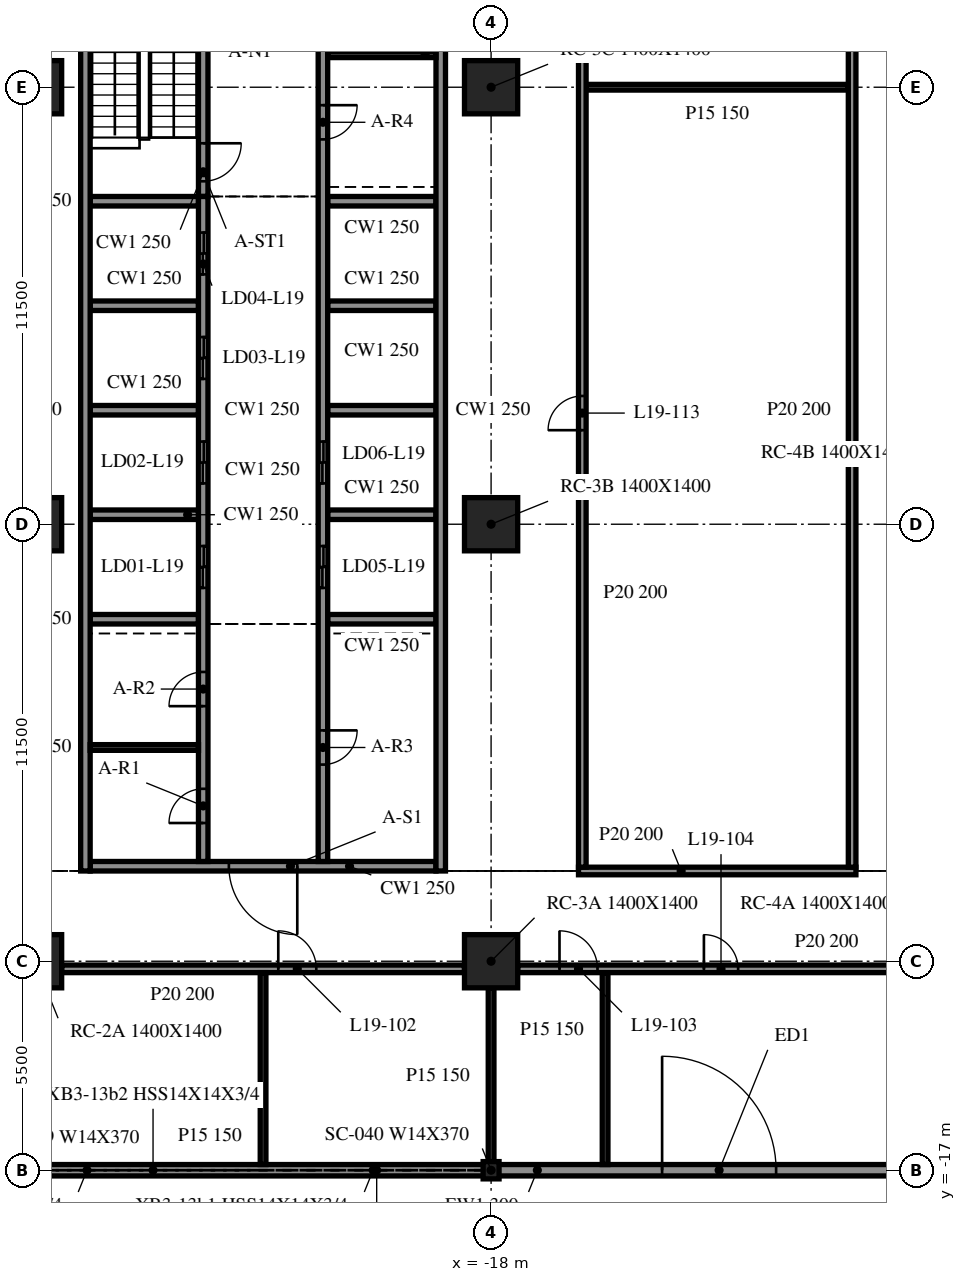
"""IFC4 building model, lengths in metres.
Left out: names, types, materials, properties, quantities, classifications, styles, units other than length and angle.
Written with IfcOpenShell. Run it as: python <this file> out.ifc"""

import sys

from ifc_helpers import new_model, si_unit, direction, frame, frame_2d, origin, origin_2d, place, context, subcontext, project, spatial, rectangle, i_section, extrude, element, fill, save


model = new_model("IFC4")
c1 = context("Model", 3, precision=1e-05, world=origin(), true_north=direction((0.0, 1.0)))
c2 = subcontext(c1, "Body", "Model", "MODEL_VIEW")
j1 = project(units=[si_unit("LENGTHUNIT", "METRE"), si_unit("PLANEANGLEUNIT", "RADIAN")], contexts=[c1])
p1 = place(None, origin())
s1 = spatial("IfcSite", under=j1, at=p1, CompositionType="ELEMENT")
p2 = place(p1, origin())
s2 = spatial("IfcBuilding", under=s1, at=p2, CompositionType="ELEMENT")
p3 = place(p2, frame((0.0, 0.0, 84.8)))
s3 = spatial("IfcBuildingStorey", under=s2, at=p3, CompositionType="ELEMENT", Elevation=84.8)
for number, where, z_axis, x_axis in (
    (1, (-30.0, -11.5, -0.34), (0.0, 0.0, 1.0), (1.0, 0.0, 0.0)),
    (2, (-30.0, 0.0, -0.34), (0.0, 0.0, 1.0), (1.0, 0.0, 0.0)),
    (3, (-30.0, 11.5, -0.34), (0.0, 0.0, 1.0), (1.0, 0.0, 0.0)),
    (4, (-18.0, -11.5, -0.34), (0.0, 0.0, 1.0), (1.0, 0.0, 0.0)),
    (5, (-18.0, 0.0, -0.34), (0.0, 0.0, 1.0), (1.0, 0.0, 0.0)),
    (6, (-18.0, 11.5, -0.34), (0.0, 0.0, 1.0), (1.0, 0.0, 0.0)),
):
    element("IfcColumn", number, at=place(p3, frame(where, z_axis=z_axis, x_axis=x_axis)), inside=s3, PredefinedType="COLUMN", context=c2, shape_type="SweptSolid", body=[
        extrude(rectangle(XDim=1.4, YDim=1.4, at=origin_2d()), origin(), (0.0, 0.0, 1.0), 4.1),
    ])
p4 = place(p3, frame((-18.0, -17.0, -0.34), z_axis=(0.0, 0.0, 1.0), x_axis=(1.0, 0.0, 0.0)))
e7 = element("IfcColumn", 7, at=p4, inside=s3, PredefinedType="COLUMN", context=c2, shape_type="SweptSolid", body=[
    extrude(i_section(OverallWidth=0.419, OverallDepth=0.455, WebThickness=0.042, FlangeThickness=0.068, at=origin_2d()), origin(), (0.0, 0.0, 1.0), 4.1),
])
p5 = place(p3, frame((-29.979, -17.0, 0.0), z_axis=(0.0, 0.0, 1.0), x_axis=(1.0, 0.0, 0.0)))
e8 = element("IfcWall", 8, at=p5, inside=s3, PredefinedType="NOTDEFINED", context=c2, shape_type="SweptSolid", body=[
    extrude(rectangle(XDim=11.958, YDim=0.3, at=frame_2d((5.979, 0.0))), origin(), (0.0, 0.0, 1.0), 3.003),
])
p6 = place(p3, frame((-17.979, -17.0, 0.0), z_axis=(0.0, 0.0, 1.0), x_axis=(1.0, 0.0, 0.0)))
e9 = element("IfcWall", 9, at=p6, inside=s3, PredefinedType="NOTDEFINED", context=c2, shape_type="SweptSolid", body=[
    extrude(rectangle(XDim=11.958, YDim=0.3, at=frame_2d((5.979, 0.0))), origin(), (0.0, 0.0, 1.0), 3.003),
])
p7 = place(p6, frame((4.479, 0.0, 0.0)))
e10 = element("IfcOpeningElement", 10, at=p7, cuts=e9, PredefinedType="OPENING", context=c2, shape_type="SweptSolid", body=[
    extrude(rectangle(XDim=3.0, YDim=2.4, at=frame_2d((1.5, 1.2))), frame((0.0, 0.16, 0.0), z_axis=(0.0, -1.0, 0.0), x_axis=(1.0, 0.0, 0.0)), (0.0, 0.0, 1.0), 0.32),
])
for number, where, z_axis, x_axis in (
    (11, (-28.675, 15.125, 0.0), (0.0, 0.0, 1.0), (0.0, -1.0, 0.0)),
    (12, (-19.325, -9.125, 0.0), (0.0, 0.0, 1.0), (0.0, 1.0, 0.0)),
):
    element("IfcWall", number, at=place(p3, frame(where, z_axis=z_axis, x_axis=x_axis)), inside=s3, PredefinedType="SOLIDWALL", context=c2, shape_type="SweptSolid", body=[
        extrude(rectangle(XDim=24.25, YDim=0.25, at=frame_2d((12.125, 0.0))), origin(), (0.0, 0.0, 1.0), 3.76),
    ])
p8 = place(p3, frame((-19.45, -9.0, 0.0), z_axis=(0.0, 0.0, 1.0), x_axis=(-1.0, 0.0, 0.0)))
e13 = element("IfcWall", 13, at=p8, inside=s3, PredefinedType="SOLIDWALL", context=c2, shape_type="SweptSolid", body=[
    extrude(rectangle(XDim=9.1, YDim=0.25, at=frame_2d((4.55, 0.0))), origin(), (0.0, 0.0, 1.0), 3.76),
])
p9 = place(p8, frame((3.65, 0.0, 0.0)))
e14 = element("IfcOpeningElement", 14, at=p9, cuts=e13, PredefinedType="OPENING", context=c2, shape_type="SweptSolid", body=[
    extrude(rectangle(XDim=1.8, YDim=2.1, at=frame_2d((0.9, 1.05))), frame((0.0, 0.135, 0.0), z_axis=(0.0, -1.0, 0.0), x_axis=(1.0, 0.0, 0.0)), (0.0, 0.0, 1.0), 0.27),
])
p10 = place(p3, frame((-25.575, -8.875, 0.0), z_axis=(0.0, 0.0, 1.0), x_axis=(0.0, 1.0, 0.0)))
e15 = element("IfcWall", 15, at=p10, inside=s3, PredefinedType="SOLIDWALL", context=c2, shape_type="SweptSolid", body=[
    extrude(rectangle(XDim=17.5, YDim=0.25, at=frame_2d((8.75, 0.0))), origin(), (0.0, 0.0, 1.0), 3.76),
])
p11 = place(p10, frame((7.2, 0.0, 0.0)))
e16 = element("IfcOpeningElement", 16, at=p11, cuts=e15, PredefinedType="OPENING", context=c2, shape_type="SweptSolid", body=[
    extrude(rectangle(XDim=1.1, YDim=2.1, at=frame_2d((0.55, 1.05))), frame((0.0, 0.135, 0.0), z_axis=(0.0, -1.0, 0.0), x_axis=(1.0, 0.0, 0.0)), (0.0, 0.0, 1.0), 0.27),
])
p12 = place(p10, frame((9.95, 0.0, 0.0)))
e17 = element("IfcOpeningElement", 17, at=p12, cuts=e15, PredefinedType="OPENING", context=c2, shape_type="SweptSolid", body=[
    extrude(rectangle(XDim=1.1, YDim=2.1, at=frame_2d((0.55, 1.05))), frame((0.0, 0.135, 0.0), z_axis=(0.0, -1.0, 0.0), x_axis=(1.0, 0.0, 0.0)), (0.0, 0.0, 1.0), 0.27),
])
p13 = place(p10, frame((12.7, 0.0, 0.0)))
e18 = element("IfcOpeningElement", 18, at=p13, cuts=e15, PredefinedType="OPENING", context=c2, shape_type="SweptSolid", body=[
    extrude(rectangle(XDim=1.1, YDim=2.1, at=frame_2d((0.55, 1.05))), frame((0.0, 0.135, 0.0), z_axis=(0.0, -1.0, 0.0), x_axis=(1.0, 0.0, 0.0)), (0.0, 0.0, 1.0), 0.27),
])
p14 = place(p10, frame((15.45, 0.0, 0.0)))
e19 = element("IfcOpeningElement", 19, at=p14, cuts=e15, PredefinedType="OPENING", context=c2, shape_type="SweptSolid", body=[
    extrude(rectangle(XDim=1.1, YDim=2.1, at=frame_2d((0.55, 1.05))), frame((0.0, 0.135, 0.0), z_axis=(0.0, -1.0, 0.0), x_axis=(1.0, 0.0, 0.0)), (0.0, 0.0, 1.0), 0.27),
])
p15 = place(p10, frame((1.012, 0.0, 0.0)))
e20 = element("IfcOpeningElement", 20, at=p15, cuts=e15, PredefinedType="OPENING", context=c2, shape_type="SweptSolid", body=[
    extrude(rectangle(XDim=0.9, YDim=2.1, at=frame_2d((0.45, 1.05))), frame((0.0, 0.135, 0.0), z_axis=(0.0, -1.0, 0.0), x_axis=(1.0, 0.0, 0.0)), (0.0, 0.0, 1.0), 0.27),
])
p16 = place(p10, frame((4.087, 0.0, 0.0)))
e21 = element("IfcOpeningElement", 21, at=p16, cuts=e15, PredefinedType="OPENING", context=c2, shape_type="SweptSolid", body=[
    extrude(rectangle(XDim=0.9, YDim=2.1, at=frame_2d((0.45, 1.05))), frame((0.0, 0.135, 0.0), z_axis=(0.0, -1.0, 0.0), x_axis=(1.0, 0.0, 0.0)), (0.0, 0.0, 1.0), 0.27),
])
p17 = place(p3, frame((-25.575, 14.875, 0.0), z_axis=(0.0, 0.0, 1.0), x_axis=(0.0, -1.0, 0.0)))
e22 = element("IfcWall", 22, at=p17, inside=s3, PredefinedType="SOLIDWALL", context=c2, shape_type="SweptSolid", body=[
    extrude(rectangle(XDim=6.25, YDim=0.25, at=frame_2d((3.125, 0.0))), origin(), (0.0, 0.0, 1.0), 3.76),
])
p18 = place(p17, frame((4.85, 0.0, 0.0)))
e23 = element("IfcOpeningElement", 23, at=p18, cuts=e22, PredefinedType="OPENING", context=c2, shape_type="SweptSolid", body=[
    extrude(rectangle(XDim=1.0, YDim=2.1, at=frame_2d((0.5, 1.05))), frame((0.0, 0.135, 0.0), z_axis=(0.0, -1.0, 0.0), x_axis=(1.0, 0.0, 0.0)), (0.0, 0.0, 1.0), 0.27),
])
p19 = place(p3, frame((-22.425, 14.875, 0.0), z_axis=(0.0, 0.0, 1.0), x_axis=(0.0, -1.0, 0.0)))
e24 = element("IfcWall", 24, at=p19, inside=s3, PredefinedType="SOLIDWALL", context=c2, shape_type="SweptSolid", body=[
    extrude(rectangle(XDim=23.75, YDim=0.25, at=frame_2d((11.875, 0.0))), origin(), (0.0, 0.0, 1.0), 3.76),
])
p20 = place(p19, frame((15.45, 0.0, 0.0)))
e25 = element("IfcOpeningElement", 25, at=p20, cuts=e24, PredefinedType="OPENING", context=c2, shape_type="SweptSolid", body=[
    extrude(rectangle(XDim=1.1, YDim=2.1, at=frame_2d((0.55, 1.05))), frame((0.0, 0.135, 0.0), z_axis=(0.0, -1.0, 0.0), x_axis=(1.0, 0.0, 0.0)), (0.0, 0.0, 1.0), 0.27),
])
p21 = place(p19, frame((12.7, 0.0, 0.0)))
e26 = element("IfcOpeningElement", 26, at=p21, cuts=e24, PredefinedType="OPENING", context=c2, shape_type="SweptSolid", body=[
    extrude(rectangle(XDim=1.1, YDim=2.1, at=frame_2d((0.55, 1.05))), frame((0.0, 0.135, 0.0), z_axis=(0.0, -1.0, 0.0), x_axis=(1.0, 0.0, 0.0)), (0.0, 0.0, 1.0), 0.27),
])
p22 = place(p19, frame((20.3, 0.0, 0.0)))
e27 = element("IfcOpeningElement", 27, at=p22, cuts=e24, PredefinedType="OPENING", context=c2, shape_type="SweptSolid", body=[
    extrude(rectangle(XDim=0.9, YDim=2.1, at=frame_2d((0.45, 1.05))), frame((0.0, 0.135, 0.0), z_axis=(0.0, -1.0, 0.0), x_axis=(1.0, 0.0, 0.0)), (0.0, 0.0, 1.0), 0.27),
])
p23 = place(p19, frame((3.847, 0.0, 0.0)))
e28 = element("IfcOpeningElement", 28, at=p23, cuts=e24, PredefinedType="OPENING", context=c2, shape_type="SweptSolid", body=[
    extrude(rectangle(XDim=0.9, YDim=2.1, at=frame_2d((0.45, 1.05))), frame((0.0, 0.135, 0.0), z_axis=(0.0, -1.0, 0.0), x_axis=(1.0, 0.0, 0.0)), (0.0, 0.0, 1.0), 0.27),
])
p24 = place(p19, frame((0.772, 0.0, 0.0)))
e29 = element("IfcOpeningElement", 29, at=p24, cuts=e24, PredefinedType="OPENING", context=c2, shape_type="SweptSolid", body=[
    extrude(rectangle(XDim=0.9, YDim=2.1, at=frame_2d((0.45, 1.05))), frame((0.0, 0.135, 0.0), z_axis=(0.0, -1.0, 0.0), x_axis=(1.0, 0.0, 0.0)), (0.0, 0.0, 1.0), 0.27),
])
for number, where, z_axis, x_axis in (
    (30, (-28.55, -2.5, 0.0), (0.0, 0.0, 1.0), (1.0, 0.0, 0.0)),
    (31, (-28.55, 0.25, 0.0), (0.0, 0.0, 1.0), (1.0, 0.0, 0.0)),
    (32, (-28.55, 3.0, 0.0), (0.0, 0.0, 1.0), (1.0, 0.0, 0.0)),
    (33, (-28.55, 5.75, 0.0), (0.0, 0.0, 1.0), (1.0, 0.0, 0.0)),
    (34, (-28.55, 8.5, 0.0), (0.0, 0.0, 1.0), (1.0, 0.0, 0.0)),
    (35, (-22.3, -2.5, 0.0), (0.0, 0.0, 1.0), (1.0, 0.0, 0.0)),
    (36, (-22.3, 0.25, 0.0), (0.0, 0.0, 1.0), (1.0, 0.0, 0.0)),
    (37, (-22.3, 3.0, 0.0), (0.0, 0.0, 1.0), (1.0, 0.0, 0.0)),
    (38, (-22.3, 5.75, 0.0), (0.0, 0.0, 1.0), (1.0, 0.0, 0.0)),
    (39, (-22.3, 8.5, 0.0), (0.0, 0.0, 1.0), (1.0, 0.0, 0.0)),
):
    element("IfcWall", number, at=place(p3, frame(where, z_axis=z_axis, x_axis=x_axis)), inside=s3, PredefinedType="SOLIDWALL", context=c2, shape_type="SweptSolid", body=[
        extrude(rectangle(XDim=2.85, YDim=0.25, at=frame_2d((1.425, 0.0))), origin(), (0.0, 0.0, 1.0), 3.76),
    ])
for number, where, z_axis, x_axis in (
    (40, (-28.55, -5.875, 0.0), (0.0, 0.0, 1.0), (1.0, 0.0, 0.0)),
    (41, (-22.3, 12.355, 0.0), (0.0, 0.0, 1.0), (1.0, 0.0, 0.0)),
):
    element("IfcWall", number, at=place(p3, frame(where, z_axis=z_axis, x_axis=x_axis)), inside=s3, PredefinedType="PARTITIONING", context=c2, shape_type="SweptSolid", body=[
        extrude(rectangle(XDim=2.85, YDim=0.15, at=frame_2d((1.425, 0.0))), origin(), (0.0, 0.0, 1.0), 3.76),
    ])
p25 = place(p3, frame((-29.3, -11.7, 0.0), z_axis=(0.0, 0.0, 1.0), x_axis=(1.0, 0.0, 0.0)))
e42 = element("IfcWall", 42, at=p25, inside=s3, PredefinedType="PARTITIONING", context=c2, shape_type="SweptSolid", body=[
    extrude(rectangle(XDim=10.6, YDim=0.2, at=frame_2d((5.3, 0.0))), origin(), (0.0, 0.0, 1.0), 3.76),
])
p26 = place(p25, frame((5.7, 0.0, 0.0)))
e43 = element("IfcOpeningElement", 43, at=p26, cuts=e42, PredefinedType="OPENING", context=c2, shape_type="SweptSolid", body=[
    extrude(rectangle(XDim=1.0, YDim=2.1, at=frame_2d((0.5, 1.05))), frame((0.0, 0.11, 0.0), z_axis=(0.0, -1.0, 0.0), x_axis=(1.0, 0.0, 0.0)), (0.0, 0.0, 1.0), 0.22),
])
p27 = place(p3, frame((-17.3, -11.7, 0.0), z_axis=(0.0, 0.0, 1.0), x_axis=(1.0, 0.0, 0.0)))
e44 = element("IfcWall", 44, at=p27, inside=s3, PredefinedType="PARTITIONING", context=c2, shape_type="SweptSolid", body=[
    extrude(rectangle(XDim=10.6, YDim=0.2, at=frame_2d((5.3, 0.0))), origin(), (0.0, 0.0, 1.0), 3.76),
])
p28 = place(p27, frame((1.1, 0.0, 0.0)))
e45 = element("IfcOpeningElement", 45, at=p28, cuts=e44, PredefinedType="OPENING", context=c2, shape_type="SweptSolid", body=[
    extrude(rectangle(XDim=1.0, YDim=2.1, at=frame_2d((0.5, 1.05))), frame((0.0, 0.11, 0.0), z_axis=(0.0, -1.0, 0.0), x_axis=(1.0, 0.0, 0.0)), (0.0, 0.0, 1.0), 0.22),
])
p29 = place(p27, frame((4.9, 0.0, 0.0)))
e46 = element("IfcOpeningElement", 46, at=p29, cuts=e44, PredefinedType="OPENING", context=c2, shape_type="SweptSolid", body=[
    extrude(rectangle(XDim=0.9, YDim=2.1, at=frame_2d((0.45, 1.05))), frame((0.0, 0.11, 0.0), z_axis=(0.0, -1.0, 0.0), x_axis=(1.0, 0.0, 0.0)), (0.0, 0.0, 1.0), 0.22),
])
p30 = place(p3, frame((-15.7, -9.125, 0.0), z_axis=(0.0, 0.0, 1.0), x_axis=(1.0, 0.0, 0.0)))
e47 = element("IfcWall", 47, at=p30, inside=s3, PredefinedType="PARTITIONING", context=c2, shape_type="SweptSolid", body=[
    extrude(rectangle(XDim=7.3, YDim=0.2, at=frame_2d((3.65, 0.0))), origin(), (0.0, 0.0, 1.0), 3.76),
])
p31 = place(p3, frame((-15.5, 11.5, 0.0), z_axis=(0.0, 0.0, 1.0), x_axis=(1.0, 0.0, 0.0)))
e48 = element("IfcWall", 48, at=p31, inside=s3, PredefinedType="PARTITIONING", context=c2, shape_type="SweptSolid", body=[
    extrude(rectangle(XDim=6.9, YDim=0.15, at=frame_2d((3.45, 0.0))), origin(), (0.0, 0.0, 1.0), 3.76),
])
p32 = place(p3, frame((-24.0, -16.85, 0.0), z_axis=(0.0, 0.0, 1.0), x_axis=(0.0, 1.0, 0.0)))
e49 = element("IfcWall", 49, at=p32, inside=s3, PredefinedType="PARTITIONING", context=c2, shape_type="SweptSolid", body=[
    extrude(rectangle(XDim=5.05, YDim=0.15, at=frame_2d((2.525, 0.0))), origin(), (0.0, 0.0, 1.0), 3.76),
])
p33 = place(p3, frame((-18.0, -16.85, 0.0), z_axis=(0.0, 0.0, 1.0), x_axis=(0.0, 1.0, 0.0)))
e50 = element("IfcWall", 50, at=p33, inside=s3, PredefinedType="PARTITIONING", context=c2, shape_type="SweptSolid", body=[
    extrude(rectangle(XDim=4.65, YDim=0.15, at=frame_2d((2.325, 0.0))), origin(), (0.0, 0.0, 1.0), 3.76),
])
p34 = place(p3, frame((-15.6, -9.025, 0.0), z_axis=(0.0, 0.0, 1.0), x_axis=(0.0, 1.0, 0.0)))
e51 = element("IfcWall", 51, at=p34, inside=s3, PredefinedType="PARTITIONING", context=c2, shape_type="SweptSolid", body=[
    extrude(rectangle(XDim=24.05, YDim=0.2, at=frame_2d((12.025, 0.0))), origin(), (0.0, 0.0, 1.0), 3.76),
])
p35 = place(p34, frame((11.5, 0.0, 0.0)))
e52 = element("IfcOpeningElement", 52, at=p35, cuts=e51, PredefinedType="OPENING", context=c2, shape_type="SweptSolid", body=[
    extrude(rectangle(XDim=0.9, YDim=2.1, at=frame_2d((0.45, 1.05))), frame((0.0, 0.11, 0.0), z_axis=(0.0, -1.0, 0.0), x_axis=(1.0, 0.0, 0.0)), (0.0, 0.0, 1.0), 0.22),
])
p36 = place(p3, frame((-15.0, -16.85, 0.0), z_axis=(0.0, 0.0, 1.0), x_axis=(0.0, 1.0, 0.0)))
e53 = element("IfcWall", 53, at=p36, inside=s3, PredefinedType="PARTITIONING", context=c2, shape_type="SweptSolid", body=[
    extrude(rectangle(XDim=5.05, YDim=0.15, at=frame_2d((2.525, 0.0))), origin(), (0.0, 0.0, 1.0), 3.76),
])
p37 = place(p3, frame((-8.5, -9.025, 0.0), z_axis=(0.0, 0.0, 1.0), x_axis=(0.0, 1.0, 0.0)))
e54 = element("IfcWall", 54, at=p37, inside=s3, PredefinedType="PARTITIONING", context=c2, shape_type="SweptSolid", body=[
    extrude(rectangle(XDim=24.05, YDim=0.2, at=frame_2d((12.025, 0.0))), origin(), (0.0, 0.0, 1.0), 3.76),
])
p38 = place(p7, origin())
e55 = element("IfcDoor", 55, at=p38, inside=s3, OperationType="SINGLE_SWING_LEFT", PredefinedType="DOOR", context=c2, shape_type="SweptSolid", body=[
    extrude(rectangle(XDim=3.0, YDim=2.4, at=frame_2d((1.5, 1.2))), frame((0.0, 0.025, 0.0), z_axis=(0.0, -1.0, 0.0), x_axis=(1.0, 0.0, 0.0)), (0.0, 0.0, 1.0), 0.05),
])
fill(e10, e55)
p39 = place(p9, origin())
e56 = element("IfcDoor", 56, at=p39, inside=s3, OperationType="DOUBLE_DOOR_SINGLE_SWING", PredefinedType="DOOR", context=c2, shape_type="SweptSolid", body=[
    extrude(rectangle(XDim=1.8, YDim=2.1, at=frame_2d((0.9, 1.05))), frame((0.0, 0.025, 0.0), z_axis=(0.0, -1.0, 0.0), x_axis=(1.0, 0.0, 0.0)), (0.0, 0.0, 1.0), 0.05),
])
fill(e14, e56)
p40 = place(p20, origin())
e57 = element("IfcDoor", 57, at=p40, inside=s3, OperationType="DOUBLE_DOOR_SLIDING", PredefinedType="DOOR", context=c2, shape_type="SweptSolid", body=[
    extrude(rectangle(XDim=1.1, YDim=2.1, at=frame_2d((0.55, 1.05))), frame((0.0, 0.025, 0.0), z_axis=(0.0, -1.0, 0.0), x_axis=(1.0, 0.0, 0.0)), (0.0, 0.0, 1.0), 0.05),
])
fill(e25, e57)
p41 = place(p21, origin())
e58 = element("IfcDoor", 58, at=p41, inside=s3, OperationType="DOUBLE_DOOR_SLIDING", PredefinedType="DOOR", context=c2, shape_type="SweptSolid", body=[
    extrude(rectangle(XDim=1.1, YDim=2.1, at=frame_2d((0.55, 1.05))), frame((0.0, 0.025, 0.0), z_axis=(0.0, -1.0, 0.0), x_axis=(1.0, 0.0, 0.0)), (0.0, 0.0, 1.0), 0.05),
])
fill(e26, e58)
p42 = place(p11, origin())
e59 = element("IfcDoor", 59, at=p42, inside=s3, OperationType="DOUBLE_DOOR_SLIDING", PredefinedType="DOOR", context=c2, shape_type="SweptSolid", body=[
    extrude(rectangle(XDim=1.1, YDim=2.1, at=frame_2d((0.55, 1.05))), frame((0.0, 0.025, 0.0), z_axis=(0.0, -1.0, 0.0), x_axis=(1.0, 0.0, 0.0)), (0.0, 0.0, 1.0), 0.05),
])
fill(e16, e59)
p43 = place(p12, origin())
e60 = element("IfcDoor", 60, at=p43, inside=s3, OperationType="DOUBLE_DOOR_SLIDING", PredefinedType="DOOR", context=c2, shape_type="SweptSolid", body=[
    extrude(rectangle(XDim=1.1, YDim=2.1, at=frame_2d((0.55, 1.05))), frame((0.0, 0.025, 0.0), z_axis=(0.0, -1.0, 0.0), x_axis=(1.0, 0.0, 0.0)), (0.0, 0.0, 1.0), 0.05),
])
fill(e17, e60)
p44 = place(p13, origin())
e61 = element("IfcDoor", 61, at=p44, inside=s3, OperationType="DOUBLE_DOOR_SLIDING", PredefinedType="DOOR", context=c2, shape_type="SweptSolid", body=[
    extrude(rectangle(XDim=1.1, YDim=2.1, at=frame_2d((0.55, 1.05))), frame((0.0, 0.025, 0.0), z_axis=(0.0, -1.0, 0.0), x_axis=(1.0, 0.0, 0.0)), (0.0, 0.0, 1.0), 0.05),
])
fill(e18, e61)
p45 = place(p14, origin())
e62 = element("IfcDoor", 62, at=p45, inside=s3, OperationType="DOUBLE_DOOR_SLIDING", PredefinedType="DOOR", context=c2, shape_type="SweptSolid", body=[
    extrude(rectangle(XDim=1.1, YDim=2.1, at=frame_2d((0.55, 1.05))), frame((0.0, 0.025, 0.0), z_axis=(0.0, -1.0, 0.0), x_axis=(1.0, 0.0, 0.0)), (0.0, 0.0, 1.0), 0.05),
])
fill(e19, e62)
p46 = place(p15, origin())
e63 = element("IfcDoor", 63, at=p46, inside=s3, OperationType="SINGLE_SWING_LEFT", PredefinedType="DOOR", context=c2, shape_type="SweptSolid", body=[
    extrude(rectangle(XDim=0.9, YDim=2.1, at=frame_2d((0.45, 1.05))), frame((0.0, 0.025, 0.0), z_axis=(0.0, -1.0, 0.0), x_axis=(1.0, 0.0, 0.0)), (0.0, 0.0, 1.0), 0.05),
])
fill(e20, e63)
p47 = place(p16, origin())
e64 = element("IfcDoor", 64, at=p47, inside=s3, OperationType="SINGLE_SWING_RIGHT", PredefinedType="DOOR", context=c2, shape_type="SweptSolid", body=[
    extrude(rectangle(XDim=0.9, YDim=2.1, at=frame_2d((0.45, 1.05))), frame((0.0, 0.025, 0.0), z_axis=(0.0, -1.0, 0.0), x_axis=(1.0, 0.0, 0.0)), (0.0, 0.0, 1.0), 0.05),
])
fill(e21, e64)
p48 = place(p22, origin())
e65 = element("IfcDoor", 65, at=p48, inside=s3, OperationType="SINGLE_SWING_LEFT", PredefinedType="DOOR", context=c2, shape_type="SweptSolid", body=[
    extrude(rectangle(XDim=0.9, YDim=2.1, at=frame_2d((0.45, 1.05))), frame((0.0, 0.025, 0.0), z_axis=(0.0, -1.0, 0.0), x_axis=(1.0, 0.0, 0.0)), (0.0, 0.0, 1.0), 0.05),
])
fill(e27, e65)
p49 = place(p23, origin())
e66 = element("IfcDoor", 66, at=p49, inside=s3, OperationType="SINGLE_SWING_RIGHT", PredefinedType="DOOR", context=c2, shape_type="SweptSolid", body=[
    extrude(rectangle(XDim=0.9, YDim=2.1, at=frame_2d((0.45, 1.05))), frame((0.0, 0.025, 0.0), z_axis=(0.0, -1.0, 0.0), x_axis=(1.0, 0.0, 0.0)), (0.0, 0.0, 1.0), 0.05),
])
fill(e28, e66)
p50 = place(p18, origin())
e67 = element("IfcDoor", 67, at=p50, inside=s3, OperationType="SINGLE_SWING_RIGHT", PredefinedType="DOOR", context=c2, shape_type="SweptSolid", body=[
    extrude(rectangle(XDim=1.0, YDim=2.1, at=frame_2d((0.5, 1.05))), frame((0.0, 0.025, 0.0), z_axis=(0.0, -1.0, 0.0), x_axis=(1.0, 0.0, 0.0)), (0.0, 0.0, 1.0), 0.05),
])
fill(e23, e67)
p51 = place(p26, origin())
e68 = element("IfcDoor", 68, at=p51, inside=s3, OperationType="SINGLE_SWING_LEFT", PredefinedType="DOOR", context=c2, shape_type="SweptSolid", body=[
    extrude(rectangle(XDim=1.0, YDim=2.1, at=frame_2d((0.5, 1.05))), frame((0.0, 0.025, 0.0), z_axis=(0.0, -1.0, 0.0), x_axis=(1.0, 0.0, 0.0)), (0.0, 0.0, 1.0), 0.05),
])
fill(e43, e68)
p52 = place(p28, origin())
e69 = element("IfcDoor", 69, at=p52, inside=s3, OperationType="SINGLE_SWING_RIGHT", PredefinedType="DOOR", context=c2, shape_type="SweptSolid", body=[
    extrude(rectangle(XDim=1.0, YDim=2.1, at=frame_2d((0.5, 1.05))), frame((0.0, 0.025, 0.0), z_axis=(0.0, -1.0, 0.0), x_axis=(1.0, 0.0, 0.0)), (0.0, 0.0, 1.0), 0.05),
])
fill(e45, e69)
p53 = place(p29, origin())
e70 = element("IfcDoor", 70, at=p53, inside=s3, OperationType="SINGLE_SWING_LEFT", PredefinedType="DOOR", context=c2, shape_type="SweptSolid", body=[
    extrude(rectangle(XDim=0.9, YDim=2.1, at=frame_2d((0.45, 1.05))), frame((0.0, 0.025, 0.0), z_axis=(0.0, -1.0, 0.0), x_axis=(1.0, 0.0, 0.0)), (0.0, 0.0, 1.0), 0.05),
])
fill(e46, e70)
p54 = place(p35, origin())
e71 = element("IfcDoor", 71, at=p54, inside=s3, OperationType="SINGLE_SWING_RIGHT", PredefinedType="DOOR", context=c2, shape_type="SweptSolid", body=[
    extrude(rectangle(XDim=0.9, YDim=2.1, at=frame_2d((0.45, 1.05))), frame((0.0, 0.025, 0.0), z_axis=(0.0, -1.0, 0.0), x_axis=(1.0, 0.0, 0.0)), (0.0, 0.0, 1.0), 0.05),
])
fill(e52, e71)
save(model, sys.argv[1])
